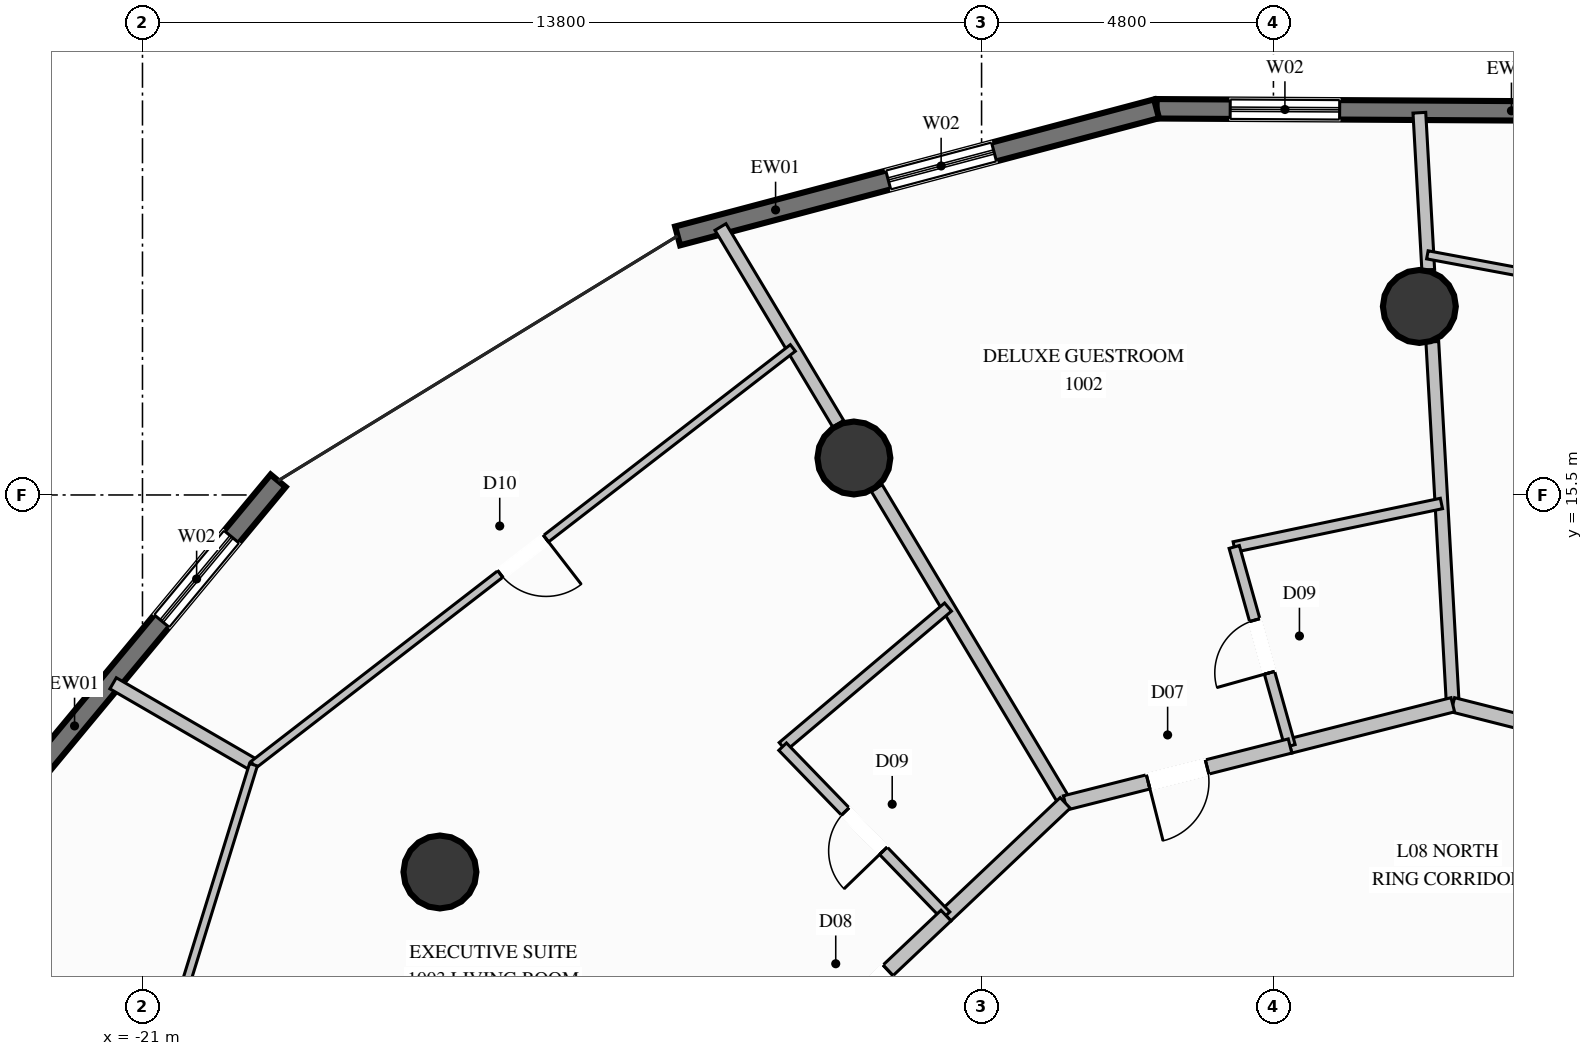
"""IFC4 building model, lengths in metres.
Left out: names, types, materials, properties, quantities, classifications, styles, units other than length and angle.
Written with IfcOpenShell. Run it as: python <this file> out.ifc"""

import sys

from ifc_helpers import new_model, si_unit, direction, frame, frame_2d, origin, origin_2d, place, context, subcontext, project, spatial, rectangle, circle, extrude, element, fill, save


model = new_model("IFC4")
c1 = context("Model", 3, precision=1e-05, world=origin(), true_north=direction((0.0, 1.0)))
c2 = subcontext(c1, "Body", "Model", "MODEL_VIEW")
j1 = project(units=[si_unit("LENGTHUNIT", "METRE"), si_unit("PLANEANGLEUNIT", "RADIAN")], contexts=[c1])
p1 = place(None, origin())
s1 = spatial("IfcSite", under=j1, at=p1, CompositionType="ELEMENT")
p2 = place(p1, origin())
s2 = spatial("IfcBuilding", under=s1, at=p2, CompositionType="ELEMENT")
p3 = place(p2, frame((0.0, 0.0, 39.2)))
s3 = spatial("IfcBuildingStorey", under=s2, at=p3, CompositionType="ELEMENT", Elevation=39.2)
for number, where, z_axis, x_axis in (
    (1, (0.0, 18.6, 0.0), (0.0, 0.0, 1.0), (1.0, 0.0, 0.0)),
    (2, (-9.3, 16.108, 0.0), (0.0, 0.0, 1.0), (1.0, 0.0, 0.0)),
    (3, (-16.108, 9.3, 0.0), (0.0, 0.0, 1.0), (1.0, 0.0, 0.0)),
):
    element("IfcColumn", number, at=place(p3, frame(where, z_axis=z_axis, x_axis=x_axis)), inside=s3, PredefinedType="COLUMN", context=c2, shape_type="SweptSolid", body=[
        extrude(circle(Radius=0.6, at=origin_2d()), origin(), (0.0, 0.0, 1.0), 3.6),
    ])
p4 = place(p3, frame((-4.322, 21.851, 0.0), z_axis=(0.0, 0.0, 1.0), x_axis=(0.999983655859, -0.005717343284, 0.0)))
e4 = element("IfcWall", 4, at=p4, inside=s3, PredefinedType="SOLIDWALL", context=c2, shape_type="SweptSolid", body=[
    extrude(rectangle(XDim=8.412, YDim=0.32, at=frame_2d((4.206, 0.0))), origin(), (0.0, 0.0, 1.0), 3.34),
])
p5 = place(p4, frame((1.211, 0.0, 0.35)))
e5 = element("IfcOpeningElement", 5, at=p5, cuts=e4, PredefinedType="OPENING", context=c2, shape_type="SweptSolid", body=[
    extrude(rectangle(XDim=1.8, YDim=2.6, at=frame_2d((0.9, 1.3))), frame((0.0, 0.17, 0.0), z_axis=(0.0, -1.0, 0.0), x_axis=(1.0, 0.0, 0.0)), (0.0, 0.0, 1.0), 0.34),
])
p6 = place(p3, frame((-12.199, 19.76, 0.0), z_axis=(0.0, 0.0, 1.0), x_axis=(0.966523209468, 0.256579199389, 0.0)))
e6 = element("IfcWall", 6, at=p6, inside=s3, PredefinedType="SOLIDWALL", context=c2, shape_type="SweptSolid", body=[
    extrude(rectangle(XDim=8.15, YDim=0.32, at=frame_2d((4.075, 0.0))), origin(), (0.0, 0.0, 1.0), 3.34),
])
p7 = place(p6, frame((3.584, 0.0, 0.35)))
e7 = element("IfcOpeningElement", 7, at=p7, cuts=e6, PredefinedType="OPENING", context=c2, shape_type="SweptSolid", body=[
    extrude(rectangle(XDim=1.8, YDim=2.6, at=frame_2d((0.9, 1.3))), frame((0.0, 0.17, 0.0), z_axis=(0.0, -1.0, 0.0), x_axis=(1.0, 0.0, 0.0)), (0.0, 0.0, 1.0), 0.34),
])
p8 = place(p3, frame((-23.39, 10.169, 0.0), z_axis=(0.0, 0.0, 1.0), x_axis=(0.638828887918, 0.769348849327, 0.0)))
e8 = element("IfcWall", 8, at=p8, inside=s3, PredefinedType="SOLIDWALL", context=c2, shape_type="SweptSolid", body=[
    extrude(rectangle(XDim=7.233, YDim=0.32, at=frame_2d((3.617, 0.0))), origin(), (0.0, 0.0, 1.0), 3.34),
])
p9 = place(p8, frame((4.235, 0.0, 0.35)))
e9 = element("IfcOpeningElement", 9, at=p9, cuts=e8, PredefinedType="OPENING", context=c2, shape_type="SweptSolid", body=[
    extrude(rectangle(XDim=1.8, YDim=2.6, at=frame_2d((0.9, 1.3))), frame((0.0, 0.17, 0.0), z_axis=(0.0, -1.0, 0.0), x_axis=(1.0, 0.0, 0.0)), (0.0, 0.0, 1.0), 0.34),
])
p10 = place(p3, frame((0.55, 12.05, 0.0), z_axis=(0.0, 0.0, 1.0), x_axis=(-0.056404232662, 0.998408014059, 0.0)))
e10 = element("IfcWall", 10, at=p10, inside=s3, PredefinedType="PARTITIONING", context=c2, shape_type="SweptSolid", body=[
    extrude(rectangle(XDim=5.978, YDim=0.21, at=frame_2d((2.989, 0.0))), origin(), (0.0, 0.0, 1.0), 2.709),
])
p11 = place(p3, frame((0.146, 19.203, 0.0), z_axis=(0.0, 0.0, 1.0), x_axis=(-0.056431669685, 0.998406463649, 0.0)))
e11 = element("IfcWall", 11, at=p11, inside=s3, PredefinedType="PARTITIONING", context=c2, shape_type="SweptSolid", body=[
    extrude(rectangle(XDim=2.587, YDim=0.21, at=frame_2d((1.293, 0.0))), origin(), (0.0, 0.0, 1.0), 3.34),
])
p12 = place(p3, frame((-5.825, 10.436, 0.0), z_axis=(0.0, 0.0, 1.0), x_axis=(-0.51360919271, 0.858024240429, 0.0)))
e12 = element("IfcWall", 12, at=p12, inside=s3, PredefinedType="PARTITIONING", context=c2, shape_type="SweptSolid", body=[
    extrude(rectangle(XDim=6.036, YDim=0.21, at=frame_2d((3.018, 0.0))), origin(), (0.0, 0.0, 1.0), 2.709),
])
p13 = place(p3, frame((-9.558, 16.672, 0.0), z_axis=(0.0, 0.0, 1.0), x_axis=(-0.513495408949, 0.858092340595, 0.0)))
e13 = element("IfcWall", 13, at=p13, inside=s3, PredefinedType="PARTITIONING", context=c2, shape_type="SweptSolid", body=[
    extrude(rectangle(XDim=3.77, YDim=0.21, at=frame_2d((1.885, 0.0))), origin(), (0.0, 0.0, 1.0), 3.34),
])
p14 = place(p3, frame((6.925, 10.436, 0.0), z_axis=(0.0, 0.0, 1.0), x_axis=(-0.969413132073, 0.245434674331, 0.0)))
e14 = element("IfcWall", 14, at=p14, inside=s3, PredefinedType="PARTITIONING", context=c2, shape_type="SweptSolid", body=[
    extrude(rectangle(XDim=6.576, YDim=0.24, at=frame_2d((3.288, 0.0))), origin(), (0.0, 0.0, 1.0), 3.34),
])
p15 = place(p3, frame((10.347, 17.547, 0.0), z_axis=(0.0, 0.0, 1.0), x_axis=(-0.983105475238, 0.183039953444, 0.0)))
e15 = element("IfcWall", 15, at=p15, inside=s3, PredefinedType="PARTITIONING", context=c2, shape_type="SweptSolid", body=[
    extrude(rectangle(XDim=10.39, YDim=0.135, at=frame_2d((5.195, 0.0))), origin(), (0.0, 0.0, 1.0), 3.34),
])
p16 = place(p15, frame((4.72, 0.0, 0.0)))
e16 = element("IfcOpeningElement", 16, at=p16, cuts=e15, PredefinedType="OPENING", context=c2, shape_type="SweptSolid", body=[
    extrude(rectangle(XDim=0.95, YDim=2.1, at=frame_2d((0.475, 1.05))), frame((0.0, 0.078, 0.0), z_axis=(0.0, -1.0, 0.0), x_axis=(1.0, 0.0, 0.0)), (0.0, 0.0, 1.0), 0.155),
])
p17 = place(p3, frame((0.55, 12.05, 0.0), z_axis=(0.0, 0.0, 1.0), x_axis=(-0.969394271919, -0.245509155779, 0.0)))
e17 = element("IfcWall", 17, at=p17, inside=s3, PredefinedType="PARTITIONING", context=c2, shape_type="SweptSolid", body=[
    extrude(rectangle(XDim=2.761, YDim=0.24, at=frame_2d((1.381, 0.0))), origin(), (0.0, 0.0, 1.0), 3.34),
])
p18 = place(p3, frame((0.363, 15.36, 0.0), z_axis=(0.0, 0.0, 1.0), x_axis=(-0.978687186143, -0.205356742475, 0.0)))
e18 = element("IfcWall", 18, at=p18, inside=s3, PredefinedType="PLUMBINGWALL", context=c2, shape_type="SweptSolid", body=[
    extrude(rectangle(XDim=3.482, YDim=0.175, at=frame_2d((1.741, 0.0))), origin(), (0.0, 0.0, 1.0), 3.34),
])
p19 = place(p3, frame((-2.127, 11.372, 0.0), z_axis=(0.0, 0.0, 1.0), x_axis=(-0.270050815193, 0.962846071402, 0.0)))
e19 = element("IfcWall", 19, at=p19, inside=s3, PredefinedType="PLUMBINGWALL", context=c2, shape_type="SweptSolid", body=[
    extrude(rectangle(XDim=3.399, YDim=0.175, at=frame_2d((1.7, 0.0))), origin(), (0.0, 0.0, 1.0), 3.34),
])
p20 = place(p19, frame((1.25, 0.0, 0.0)))
e20 = element("IfcOpeningElement", 20, at=p20, cuts=e19, PredefinedType="OPENING", context=c2, shape_type="SweptSolid", body=[
    extrude(rectangle(XDim=0.9, YDim=2.1, at=frame_2d((0.45, 1.05))), frame((0.0, 0.098, 0.0), z_axis=(0.0, -1.0, 0.0), x_axis=(1.0, 0.0, 0.0)), (0.0, 0.0, 1.0), 0.195),
])
p21 = place(p3, frame((-2.127, 11.372, 0.0), z_axis=(0.0, 0.0, 1.0), x_axis=(-0.969426781934, -0.245380754072, 0.0)))
e21 = element("IfcWall", 21, at=p21, inside=s3, PredefinedType="PARTITIONING", context=c2, shape_type="SweptSolid", body=[
    extrude(rectangle(XDim=3.815, YDim=0.24, at=frame_2d((1.907, 0.0))), origin(), (0.0, 0.0, 1.0), 3.34),
])
p22 = place(p21, frame((1.407, 0.0, 0.0)))
e22 = element("IfcOpeningElement", 22, at=p22, cuts=e21, PredefinedType="OPENING", context=c2, shape_type="SweptSolid", body=[
    extrude(rectangle(XDim=1.0, YDim=2.2, at=frame_2d((0.5, 1.1))), frame((0.0, 0.13, 0.0), z_axis=(0.0, -1.0, 0.0), x_axis=(1.0, 0.0, 0.0)), (0.0, 0.0, 1.0), 0.26),
])
p23 = place(p3, frame((-5.825, 10.436, 0.0), z_axis=(0.0, 0.0, 1.0), x_axis=(-0.726651583854, -0.687006168591, 0.0)))
e23 = element("IfcWall", 23, at=p23, inside=s3, PredefinedType="PARTITIONING", context=c2, shape_type="SweptSolid", body=[
    extrude(rectangle(XDim=2.697, YDim=0.24, at=frame_2d((1.349, 0.0))), origin(), (0.0, 0.0, 1.0), 3.34),
])
p24 = place(p3, frame((-7.752, 13.656, 0.0), z_axis=(0.0, 0.0, 1.0), x_axis=(-0.764298879833, -0.644862173093, 0.0)))
e24 = element("IfcWall", 24, at=p24, inside=s3, PredefinedType="PLUMBINGWALL", context=c2, shape_type="SweptSolid", body=[
    extrude(rectangle(XDim=3.559, YDim=0.175, at=frame_2d((1.779, 0.0))), origin(), (0.0, 0.0, 1.0), 3.34),
])
p25 = place(p3, frame((-7.785, 8.583, 0.0), z_axis=(0.0, 0.0, 1.0), x_axis=(-0.695227790949, 0.718789481484, 0.0)))
e25 = element("IfcWall", 25, at=p25, inside=s3, PredefinedType="PLUMBINGWALL", context=c2, shape_type="SweptSolid", body=[
    extrude(rectangle(XDim=3.865, YDim=0.175, at=frame_2d((1.933, 0.0))), origin(), (0.0, 0.0, 1.0), 3.34),
])
p26 = place(p25, frame((1.482, 0.0, 0.0)))
e26 = element("IfcOpeningElement", 26, at=p26, cuts=e25, PredefinedType="OPENING", context=c2, shape_type="SweptSolid", body=[
    extrude(rectangle(XDim=0.9, YDim=2.1, at=frame_2d((0.45, 1.05))), frame((0.0, 0.098, 0.0), z_axis=(0.0, -1.0, 0.0), x_axis=(1.0, 0.0, 0.0)), (0.0, 0.0, 1.0), 0.195),
])
p27 = place(p3, frame((-19.175, 11.064, 0.0), z_axis=(0.0, 0.0, 1.0), x_axis=(-0.864941429029, 0.501872816907, 0.0)))
e27 = element("IfcWall", 27, at=p27, inside=s3, PredefinedType="PARTITIONING", context=c2, shape_type="SweptSolid", body=[
    extrude(rectangle(XDim=2.668, YDim=0.21, at=frame_2d((1.334, 0.0))), origin(), (0.0, 0.0, 1.0), 3.34),
])
p28 = place(p3, frame((-7.785, 8.583, 0.0), z_axis=(0.0, 0.0, 1.0), x_axis=(-0.726816794063, -0.686831382413, 0.0)))
e28 = element("IfcWall", 28, at=p28, inside=s3, PredefinedType="PARTITIONING", context=c2, shape_type="SweptSolid", body=[
    extrude(rectangle(XDim=3.725, YDim=0.24, at=frame_2d((1.862, 0.0))), origin(), (0.0, 0.0, 1.0), 3.34),
])
p29 = place(p28, frame((1.312, 0.0, 0.0)))
e29 = element("IfcOpeningElement", 29, at=p29, cuts=e28, PredefinedType="OPENING", context=c2, shape_type="SweptSolid", body=[
    extrude(rectangle(XDim=1.1, YDim=2.3, at=frame_2d((0.55, 1.15))), frame((0.0, 0.13, 0.0), z_axis=(0.0, -1.0, 0.0), x_axis=(1.0, 0.0, 0.0)), (0.0, 0.0, 1.0), 0.26),
])
p30 = place(p3, frame((-10.304, 17.918, 0.0), z_axis=(0.0, 0.0, 1.0), x_axis=(-0.791325231215, -0.611395435412, 0.0)))
e30 = element("IfcWall", 30, at=p30, inside=s3, PredefinedType="PARTITIONING", context=c2, shape_type="SweptSolid", body=[
    extrude(rectangle(XDim=11.21, YDim=0.135, at=frame_2d((5.605, 0.0))), origin(), (0.0, 0.0, 1.0), 3.34),
])
p31 = place(p30, frame((5.13, 0.0, 0.0)))
e31 = element("IfcOpeningElement", 31, at=p31, cuts=e30, PredefinedType="OPENING", context=c2, shape_type="SweptSolid", body=[
    extrude(rectangle(XDim=0.95, YDim=2.1, at=frame_2d((0.475, 1.05))), frame((0.0, 0.078, 0.0), z_axis=(0.0, -1.0, 0.0), x_axis=(1.0, 0.0, 0.0)), (0.0, 0.0, 1.0), 0.155),
])
p32 = place(p3, frame((-19.175, 11.064, 0.0), z_axis=(0.0, 0.0, 1.0), x_axis=(-0.295395137922, -0.955375168451, 0.0)))
e32 = element("IfcWall", 32, at=p32, inside=s3, PredefinedType="PARTITIONING", context=c2, shape_type="SweptSolid", body=[
    extrude(rectangle(XDim=11.581, YDim=0.135, at=frame_2d((5.791, 0.0))), origin(), (0.0, 0.0, 1.0), 3.34),
])
p33 = place(p32, frame((5.315, 0.0, 0.0)))
e33 = element("IfcOpeningElement", 33, at=p33, cuts=e32, PredefinedType="OPENING", context=c2, shape_type="SweptSolid", body=[
    extrude(rectangle(XDim=0.95, YDim=2.1, at=frame_2d((0.475, 1.05))), frame((0.0, 0.078, 0.0), z_axis=(0.0, -1.0, 0.0), x_axis=(1.0, 0.0, 0.0)), (0.0, 0.0, 1.0), 0.155),
])
p34 = place(p5, origin())
e34 = element("IfcWindow", 34, at=p34, inside=s3, PartitioningType="SINGLE_PANEL", PredefinedType="WINDOW", context=c2, shape_type="SweptSolid", body=[
    extrude(rectangle(XDim=1.8, YDim=2.6, at=frame_2d((0.9, 1.3))), frame((0.0, 0.03, 0.0), z_axis=(0.0, -1.0, 0.0), x_axis=(1.0, 0.0, 0.0)), (0.0, 0.0, 1.0), 0.06),
])
fill(e5, e34)
p35 = place(p7, origin())
e35 = element("IfcWindow", 35, at=p35, inside=s3, PartitioningType="SINGLE_PANEL", PredefinedType="WINDOW", context=c2, shape_type="SweptSolid", body=[
    extrude(rectangle(XDim=1.8, YDim=2.6, at=frame_2d((0.9, 1.3))), frame((0.0, 0.03, 0.0), z_axis=(0.0, -1.0, 0.0), x_axis=(1.0, 0.0, 0.0)), (0.0, 0.0, 1.0), 0.06),
])
fill(e7, e35)
p36 = place(p9, origin())
e36 = element("IfcWindow", 36, at=p36, inside=s3, PartitioningType="SINGLE_PANEL", PredefinedType="WINDOW", context=c2, shape_type="SweptSolid", body=[
    extrude(rectangle(XDim=1.8, YDim=2.6, at=frame_2d((0.9, 1.3))), frame((0.0, 0.03, 0.0), z_axis=(0.0, -1.0, 0.0), x_axis=(1.0, 0.0, 0.0)), (0.0, 0.0, 1.0), 0.06),
])
fill(e9, e36)
p37 = place(p20, origin())
e37 = element("IfcDoor", 37, at=p37, inside=s3, OperationType="SINGLE_SWING_LEFT", PredefinedType="DOOR", context=c2, shape_type="SweptSolid", body=[
    extrude(rectangle(XDim=0.9, YDim=2.1, at=frame_2d((0.45, 1.05))), frame((0.0, 0.025, 0.0), z_axis=(0.0, -1.0, 0.0), x_axis=(1.0, 0.0, 0.0)), (0.0, 0.0, 1.0), 0.05),
])
fill(e20, e37)
p38 = place(p22, origin())
e38 = element("IfcDoor", 38, at=p38, inside=s3, OperationType="SINGLE_SWING_RIGHT", PredefinedType="DOOR", context=c2, shape_type="SweptSolid", body=[
    extrude(rectangle(XDim=1.0, YDim=2.2, at=frame_2d((0.5, 1.1))), frame((0.0, 0.025, 0.0), z_axis=(0.0, -1.0, 0.0), x_axis=(1.0, 0.0, 0.0)), (0.0, 0.0, 1.0), 0.05),
])
fill(e22, e38)
p39 = place(p26, origin())
e39 = element("IfcDoor", 39, at=p39, inside=s3, OperationType="SINGLE_SWING_LEFT", PredefinedType="DOOR", context=c2, shape_type="SweptSolid", body=[
    extrude(rectangle(XDim=0.9, YDim=2.1, at=frame_2d((0.45, 1.05))), frame((0.0, 0.025, 0.0), z_axis=(0.0, -1.0, 0.0), x_axis=(1.0, 0.0, 0.0)), (0.0, 0.0, 1.0), 0.05),
])
fill(e26, e39)
p40 = place(p29, origin())
e40 = element("IfcDoor", 40, at=p40, inside=s3, OperationType="SINGLE_SWING_RIGHT", PredefinedType="DOOR", context=c2, shape_type="SweptSolid", body=[
    extrude(rectangle(XDim=1.1, YDim=2.3, at=frame_2d((0.55, 1.15))), frame((0.0, 0.025, 0.0), z_axis=(0.0, -1.0, 0.0), x_axis=(1.0, 0.0, 0.0)), (0.0, 0.0, 1.0), 0.05),
])
fill(e29, e40)
p41 = place(p31, origin())
e41 = element("IfcDoor", 41, at=p41, inside=s3, OperationType="SINGLE_SWING_LEFT", PredefinedType="DOOR", context=c2, shape_type="SweptSolid", body=[
    extrude(rectangle(XDim=0.95, YDim=2.1, at=frame_2d((0.475, 1.05))), frame((0.0, 0.025, 0.0), z_axis=(0.0, -1.0, 0.0), x_axis=(1.0, 0.0, 0.0)), (0.0, 0.0, 1.0), 0.05),
])
fill(e31, e41)
save(model, sys.argv[1])
